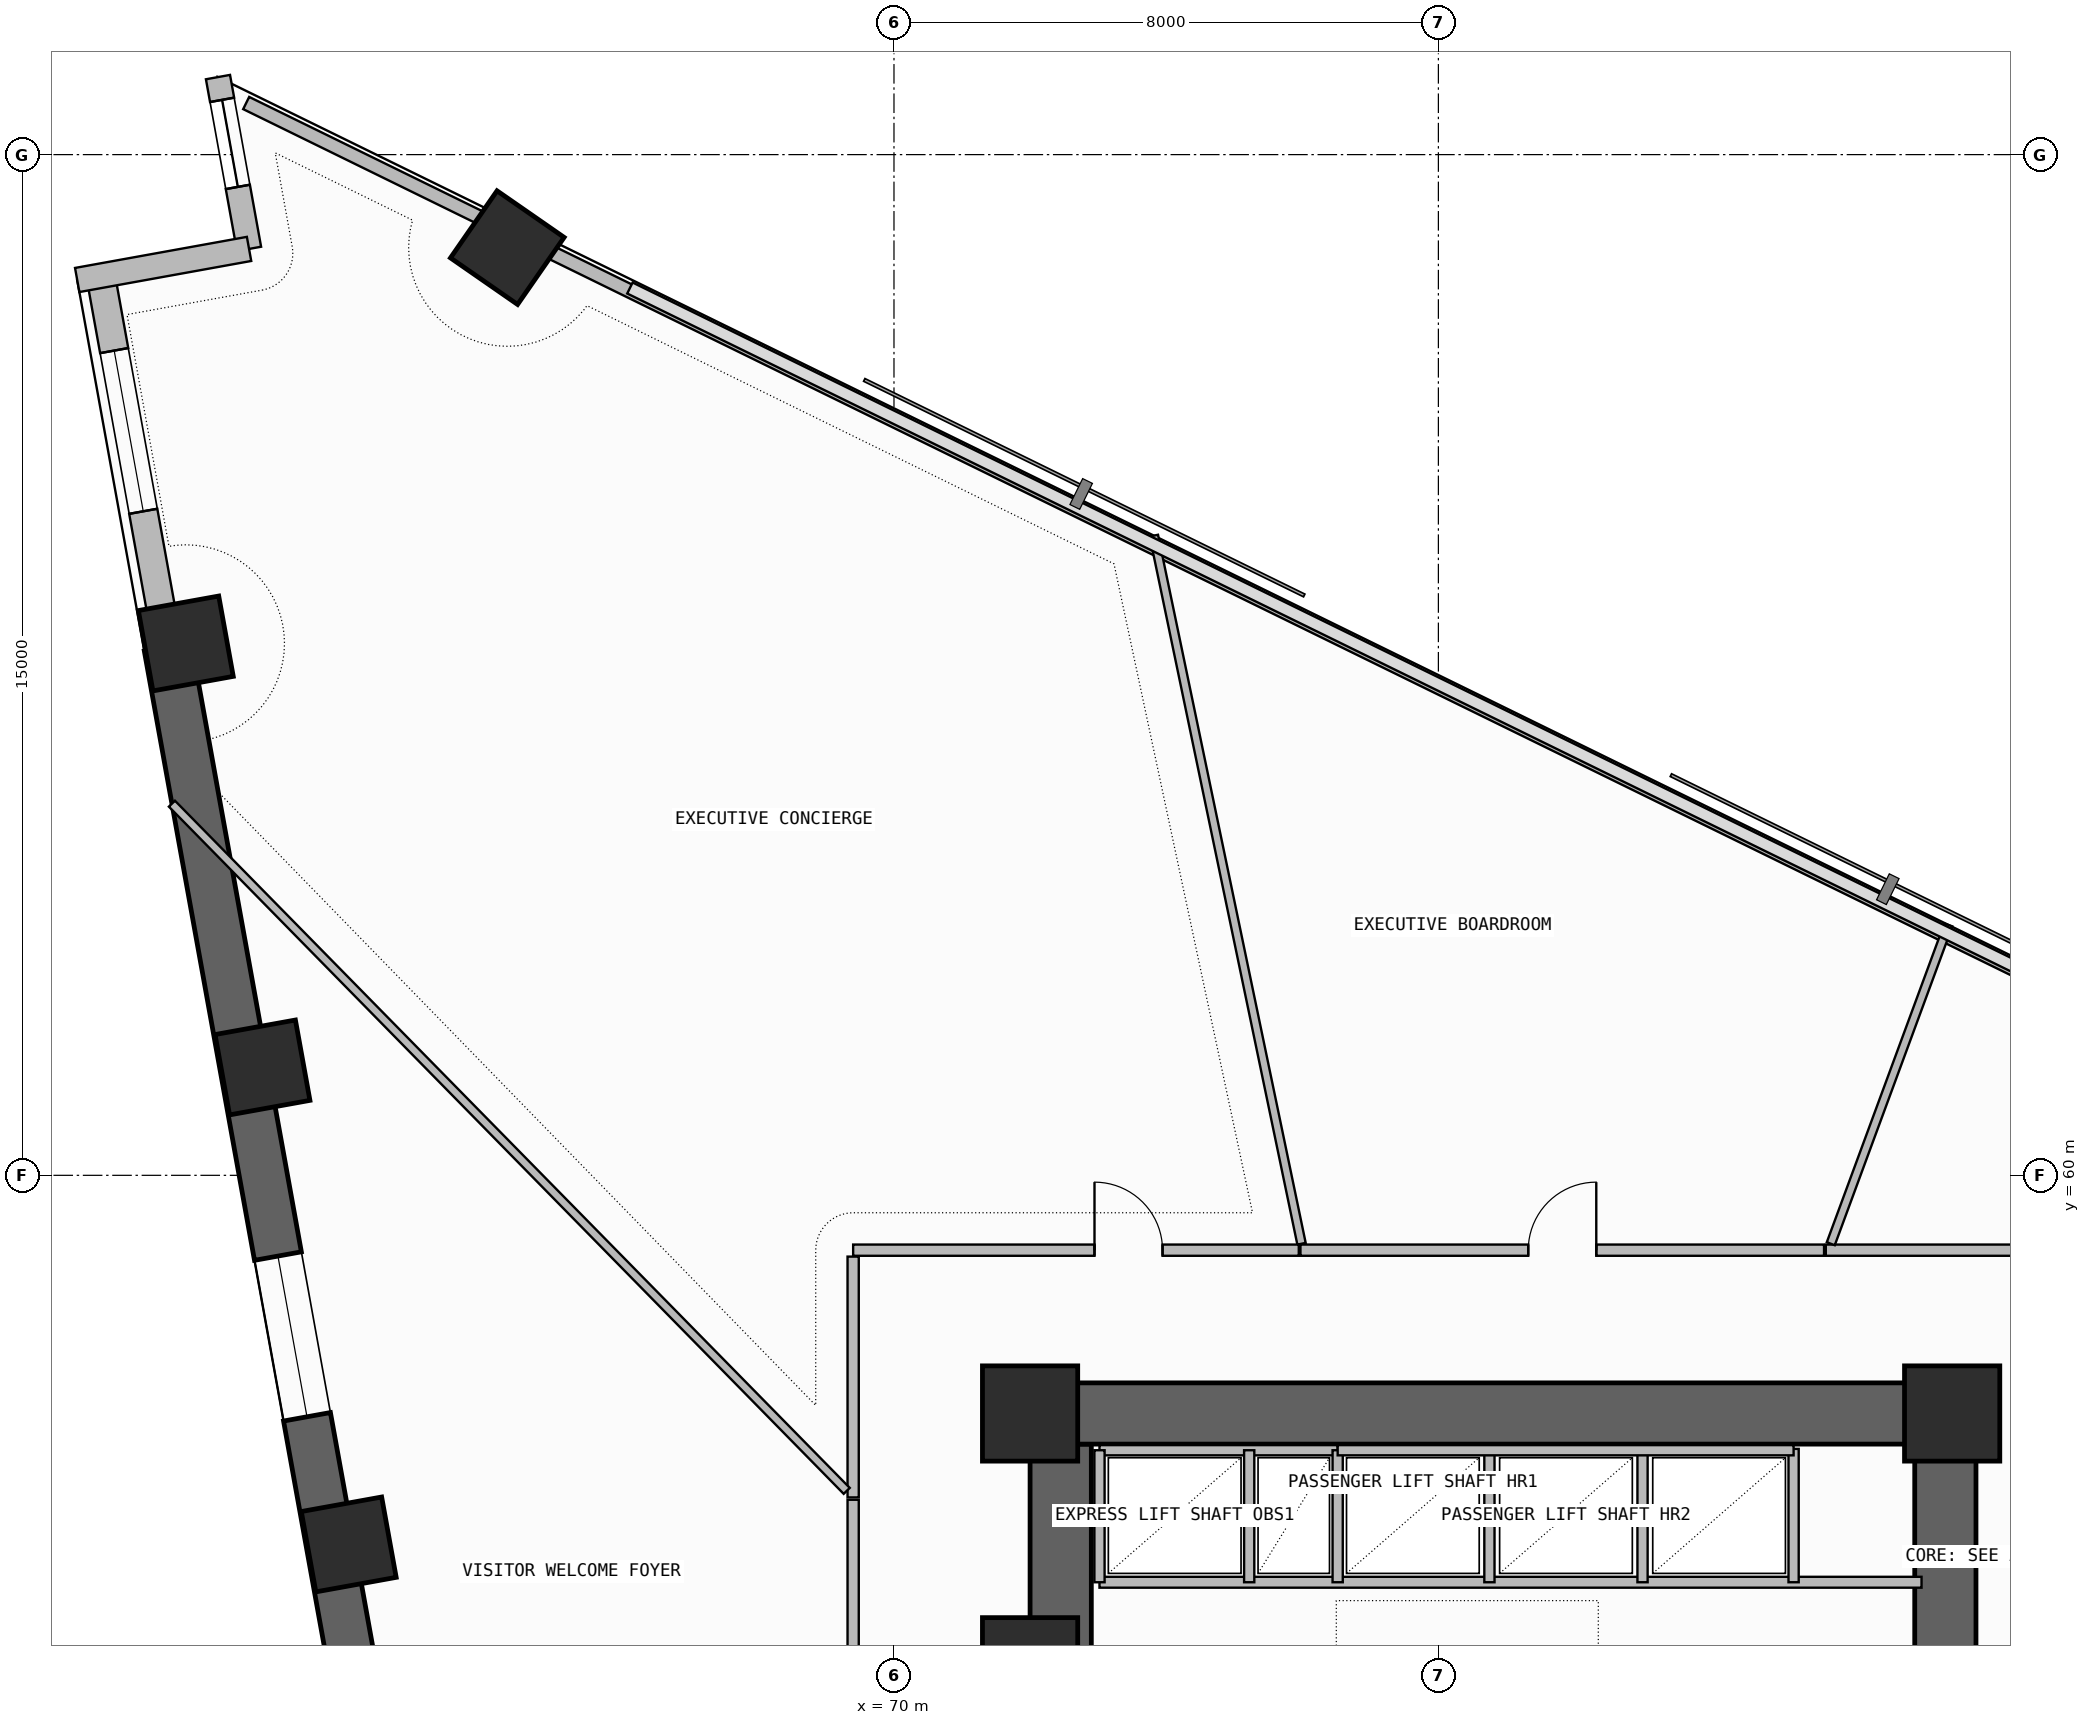
"""IFC4 building model, lengths in metres.
Left out: names, types, materials, properties, quantities, classifications, styles, units other than length and angle.
Written with IfcOpenShell. Run it as: python <this file> out.ifc"""

import sys

from ifc_helpers import new_model, si_unit, direction, frame, frame_2d, origin, origin_2d, place, context, subcontext, project, spatial, rectangle, extrude, element, fill, save


model = new_model("IFC4")
c1 = context("Model", 3, precision=1e-05, world=origin(), true_north=direction((0.0, 1.0)))
c2 = subcontext(c1, "Body", "Model", "MODEL_VIEW")
j1 = project(units=[si_unit("LENGTHUNIT", "METRE"), si_unit("PLANEANGLEUNIT", "RADIAN")], contexts=[c1])
p1 = place(None, origin())
s1 = spatial("IfcSite", under=j1, at=p1, CompositionType="ELEMENT")
p2 = place(p1, origin())
s2 = spatial("IfcBuilding", under=s1, at=p2, CompositionType="ELEMENT")
p3 = place(p2, frame((0.0, 0.0, 99.3)))
s3 = spatial("IfcBuildingStorey", under=s2, at=p3, CompositionType="ELEMENT", Elevation=99.3)
p4 = place(p3, frame((72.45, 43.35, -0.26), z_axis=(0.0, 0.0, 1.0), x_axis=(0.0, 1.0, 0.0)))
e1 = element("IfcWall", 1, at=p4, inside=s3, PredefinedType="SHEAR", context=c2, shape_type="SweptSolid", body=[
    extrude(rectangle(XDim=12.7, YDim=0.9, at=frame_2d((6.35, 0.0))), origin(), (0.0, 0.0, 1.0), 3.6),
])
p5 = place(p4, frame((1.35, 0.0, 0.26)))
e2 = element("IfcOpeningElement", 2, at=p5, cuts=e1, PredefinedType="OPENING", context=c2, shape_type="SweptSolid", body=[
    extrude(rectangle(XDim=1.2, YDim=2.2, at=frame_2d((0.6, 1.1))), frame((0.0, 0.46, 0.0), z_axis=(0.0, -1.0, 0.0), x_axis=(1.0, 0.0, 0.0)), (0.0, 0.0, 1.0), 0.92),
])
p6 = place(p3, frame((72.0, 56.5, -0.26), z_axis=(0.0, 0.0, 1.0), x_axis=(1.0, 0.0, 0.0)))
e3 = element("IfcWall", 3, at=p6, inside=s3, PredefinedType="SHEAR", context=c2, shape_type="SweptSolid", body=[
    extrude(rectangle(XDim=13.9, YDim=0.9, at=frame_2d((6.95, 0.0))), origin(), (0.0, 0.0, 1.0), 3.6),
])
p7 = place(p3, frame((85.45, 47.6, -0.26), z_axis=(0.0, 0.0, 1.0), x_axis=(0.0, 1.0, 0.0)))
e4 = element("IfcWall", 4, at=p7, inside=s3, PredefinedType="SHEAR", context=c2, shape_type="SweptSolid", body=[
    extrude(rectangle(XDim=8.45, YDim=0.9, at=frame_2d((4.225, 0.0))), origin(), (0.0, 0.0, 1.0), 3.6),
])
for number, where, z_axis, x_axis in (
    (5, (72.0, 52.8, 0.0), (0.0, 0.0, 1.0), (1.0, 0.0, 0.0)),
    (6, (72.0, 56.5, 0.0), (0.0, 0.0, 1.0), (1.0, 0.0, 0.0)),
    (7, (85.55, 56.5, 0.0), (0.0, 0.0, 1.0), (1.0, 0.0, 0.0)),
):
    element("IfcColumn", number, at=place(p3, frame(where, z_axis=z_axis, x_axis=x_axis)), inside=s3, PredefinedType="COLUMN", context=c2, shape_type="SweptSolid", body=[
        extrude(rectangle(XDim=1.4, YDim=1.4, at=origin_2d()), origin(), (0.0, 0.0, 1.0), 3.6),
    ])
for number, where, z_axis, x_axis in (
    (8, (64.318, 73.633, 0.0), (0.0, 0.0, 1.0), (0.57, 0.822, 0.0)),
    (9, (59.594, 67.816, 0.0), (0.0, 0.0, 1.0), (-0.178, 0.984, 0.0)),
    (10, (60.72, 61.585, 0.0), (0.0, 0.0, 1.0), (-0.178, 0.984, 0.0)),
    (11, (61.988, 54.575, 0.0), (0.0, 0.0, 1.0), (-0.178, 0.984, 0.0)),
):
    element("IfcColumn", number, at=place(p3, frame(where, z_axis=z_axis, x_axis=x_axis)), inside=s3, PredefinedType="COLUMN", context=c2, shape_type="SweptSolid", body=[
        extrude(rectangle(XDim=1.2, YDim=1.2, at=origin_2d()), origin(), (0.0, 0.0, 1.0), 3.6),
    ])
p8 = place(p3, frame((58.342, 73.22, 0.0), z_axis=(0.0, 0.0, 1.0), x_axis=(0.177981837245, -0.984033772597, 0.0)))
e12 = element("IfcWall", 12, at=p8, inside=s3, PredefinedType="SOLIDWALL", context=c2, shape_type="SweptSolid", body=[
    extrude(rectangle(XDim=5.54, YDim=0.42, at=frame_2d((2.77, 0.0))), origin(), (0.0, 0.0, 1.0), 2.725),
])
p9 = place(p8, frame((1.118, 0.0, 1.2)))
e13 = element("IfcOpeningElement", 13, at=p9, cuts=e12, PredefinedType="OPENING", context=c2, shape_type="SweptSolid", body=[
    extrude(rectangle(XDim=2.4, YDim=0.9, at=frame_2d((1.2, 0.45))), frame((0.0, 0.22, 0.0), z_axis=(0.0, -1.0, 0.0), x_axis=(1.0, 0.0, 0.0)), (0.0, 0.0, 1.0), 0.44),
])
p10 = place(p3, frame((59.328, 67.768, -0.26), z_axis=(0.0, 0.0, 1.0), x_axis=(0.177933213615, -0.984042565895, 0.0)))
e14 = element("IfcWall", 14, at=p10, inside=s3, PredefinedType="SHEAR", context=c2, shape_type="SweptSolid", body=[
    extrude(rectangle(XDim=20.579, YDim=0.7, at=frame_2d((10.289, 0.0))), origin(), (0.0, 0.0, 1.0), 3.6),
])
p11 = place(p10, frame((9.1, 0.0, 1.2)))
e15 = element("IfcOpeningElement", 15, at=p11, cuts=e14, PredefinedType="OPENING", context=c2, shape_type="SweptSolid", body=[
    extrude(rectangle(XDim=2.4, YDim=0.9, at=frame_2d((1.2, 0.45))), frame((0.0, 0.36, 0.0), z_axis=(0.0, -1.0, 0.0), x_axis=(1.0, 0.0, 0.0)), (0.0, 0.0, 1.0), 0.72),
])
p12 = place(p3, frame((60.066, 76.139, 0.0), z_axis=(0.0, 0.0, 1.0), x_axis=(0.177897493713, -0.984049024048, 0.0)))
e16 = element("IfcWall", 16, at=p12, inside=s3, PredefinedType="SOLIDWALL", context=c2, shape_type="SweptSolid", body=[
    extrude(rectangle(XDim=2.566, YDim=0.36, at=frame_2d((1.283, 0.0))), origin(), (0.0, 0.0, 1.0), 3.34),
])
p13 = place(p12, frame((0.34, 0.0, 0.45)))
e17 = element("IfcOpeningElement", 17, at=p13, cuts=e16, PredefinedType="OPENING", context=c2, shape_type="SweptSolid", body=[
    extrude(rectangle(XDim=1.3, YDim=2.4, at=frame_2d((0.65, 1.2))), frame((0.0, 0.19, 0.0), z_axis=(0.0, -1.0, 0.0), x_axis=(1.0, 0.0, 0.0)), (0.0, 0.0, 1.0), 0.38),
])
p14 = place(p3, frame((60.523, 73.614, 0.0), z_axis=(0.0, 0.0, 1.0), x_axis=(-0.984046012923, -0.177914149102, 0.0)))
e18 = element("IfcWall", 18, at=p14, inside=s3, PredefinedType="SOLIDWALL", context=c2, shape_type="SweptSolid", body=[
    extrude(rectangle(XDim=2.566, YDim=0.36, at=frame_2d((1.283, 0.0))), origin(), (0.0, 0.0, 1.0), 3.34),
])
p15 = place(p3, frame((88.921, 61.823, 0.0), z_axis=(0.0, 0.0, 1.0), x_axis=(-0.897993533426, 0.440008652103, 0.0)))
e19 = element("IfcWall", 19, at=p15, inside=s3, PredefinedType="PARAPET", context=c2, shape_type="SweptSolid", body=[
    extrude(rectangle(XDim=26.864, YDim=0.2, at=frame_2d((13.432, 0.0))), origin(), (0.0, 0.0, 1.0), 1.15),
])
p16 = place(p3, frame((64.032, 74.018, 0.0), z_axis=(0.0, 0.0, 1.0), x_axis=(-0.89799103332, 0.440013754417, 0.0)))
e20 = element("IfcWall", 20, at=p16, inside=s3, PredefinedType="PARAPET", context=c2, shape_type="SweptSolid", body=[
    extrude(rectangle(XDim=3.955, YDim=0.2, at=frame_2d((1.978, 0.0))), origin(), (0.0, 0.0, 1.0), 1.15),
])
p17 = place(p3, frame((73.02, 54.02, 0.0), z_axis=(0.0, 0.0, 1.0), x_axis=(1.0, 0.0, 0.0)))
e21 = element("IfcWall", 21, at=p17, inside=s3, PredefinedType="SOLIDWALL", context=c2, shape_type="SweptSolid", body=[
    extrude(rectangle(XDim=12.08, YDim=0.16, at=frame_2d((6.04, 0.0))), origin(), (0.0, 0.0, 1.0), 3.34),
])
p18 = place(p3, frame((73.02, 55.96, 0.0), z_axis=(0.0, 0.0, 1.0), x_axis=(1.0, 0.0, 0.0)))
e22 = element("IfcWall", 22, at=p18, inside=s3, PredefinedType="SOLIDWALL", context=c2, shape_type="SweptSolid", body=[
    extrude(rectangle(XDim=3.5, YDim=0.15, at=frame_2d((1.75, 0.0))), origin(), (0.0, 0.0, 1.0), 3.34),
])
p19 = place(p3, frame((73.02, 54.02, 0.0), z_axis=(0.0, 0.0, 1.0), x_axis=(0.0, 1.0, 0.0)))
e23 = element("IfcWall", 23, at=p19, inside=s3, PredefinedType="PLUMBINGWALL", context=c2, shape_type="SweptSolid", body=[
    extrude(rectangle(XDim=1.94, YDim=0.15, at=frame_2d((0.97, 0.0))), origin(), (0.0, 0.0, 1.0), 3.34),
])
p20 = place(p3, frame((76.52, 54.02, 0.0), z_axis=(0.0, 0.0, 1.0), x_axis=(0.0, 1.0, 0.0)))
e24 = element("IfcWall", 24, at=p20, inside=s3, PredefinedType="SOLIDWALL", context=c2, shape_type="SweptSolid", body=[
    extrude(rectangle(XDim=1.94, YDim=0.15, at=frame_2d((0.97, 0.0))), origin(), (0.0, 0.0, 1.0), 3.34),
])
p21 = place(p3, frame((75.22, 54.02, 0.0), z_axis=(0.0, 0.0, 1.0), x_axis=(0.0, 1.0, 0.0)))
e25 = element("IfcWall", 25, at=p21, inside=s3, PredefinedType="PLUMBINGWALL", context=c2, shape_type="SweptSolid", body=[
    extrude(rectangle(XDim=1.94, YDim=0.15, at=frame_2d((0.97, 0.0))), origin(), (0.0, 0.0, 1.0), 3.34),
])
for number, where, z_axis, x_axis in (
    (26, (78.75, 54.02, 0.0), (0.0, 0.0, 1.0), (0.0, 1.0, 0.0)),
    (27, (81.0, 54.02, 0.0), (0.0, 0.0, 1.0), (0.0, 1.0, 0.0)),
):
    element("IfcWall", number, at=place(p3, frame(where, z_axis=z_axis, x_axis=x_axis)), inside=s3, PredefinedType="PLUMBINGWALL", context=c2, shape_type="SweptSolid", body=[
        extrude(rectangle(XDim=1.96, YDim=0.15, at=frame_2d((0.98, 0.0))), origin(), (0.0, 0.0, 1.0), 3.34),
    ])
p22 = place(p3, frame((83.22, 54.02, 0.0), z_axis=(0.0, 0.0, 1.0), x_axis=(0.0, 1.0, 0.0)))
e28 = element("IfcWall", 28, at=p22, inside=s3, PredefinedType="SOLIDWALL", context=c2, shape_type="SweptSolid", body=[
    extrude(rectangle(XDim=1.96, YDim=0.15, at=frame_2d((0.98, 0.0))), origin(), (0.0, 0.0, 1.0), 3.34),
])
p23 = place(p3, frame((76.52, 55.96, 0.0), z_axis=(0.0, 0.0, 1.0), x_axis=(1.0, 0.0, 0.0)))
e29 = element("IfcWall", 29, at=p23, inside=s3, PredefinedType="SOLIDWALL", context=c2, shape_type="SweptSolid", body=[
    extrude(rectangle(XDim=6.7, YDim=0.15, at=frame_2d((3.35, 0.0))), origin(), (0.0, 0.0, 1.0), 3.34),
])
p24 = place(p3, frame((93.442, 58.9, 0.0), z_axis=(0.0, 0.0, 1.0), x_axis=(-1.0, 0.0, 0.0)))
e30 = element("IfcWall", 30, at=p24, inside=s3, PredefinedType="PARTITIONING", context=c2, shape_type="SweptSolid", body=[
    extrude(rectangle(XDim=9.749, YDim=0.165, at=frame_2d((4.875, 0.0))), origin(), (0.0, 0.0, 1.0), 2.725),
])
p25 = place(p3, frame((83.766, 58.994, 0.0), z_axis=(0.0, 0.0, 1.0), x_axis=(0.345974939757, 0.938243753542, 0.0)))
e31 = element("IfcWall", 31, at=p25, inside=s3, PredefinedType="PARTITIONING", context=c2, shape_type="SweptSolid", body=[
    extrude(rectangle(XDim=4.994, YDim=0.125, at=frame_2d((2.497, 0.0))), origin(), (0.0, 0.0, 1.0), 3.34),
])
p26 = place(p3, frame((83.667, 58.9, 0.0), z_axis=(0.0, 0.0, 1.0), x_axis=(-1.0, 0.0, 0.0)))
e32 = element("IfcWall", 32, at=p26, inside=s3, PredefinedType="PARTITIONING", context=c2, shape_type="SweptSolid", body=[
    extrude(rectangle(XDim=7.694, YDim=0.165, at=frame_2d((3.847, 0.0))), origin(), (0.0, 0.0, 1.0), 3.34),
])
p27 = place(p26, frame((3.347, 0.0, 0.0)))
e33 = element("IfcOpeningElement", 33, at=p27, cuts=e32, PredefinedType="OPENING", context=c2, shape_type="SweptSolid", body=[
    extrude(rectangle(XDim=1.0, YDim=2.2, at=frame_2d((0.5, 1.1))), frame((0.0, 0.093, 0.0), z_axis=(0.0, -1.0, 0.0), x_axis=(1.0, 0.0, 0.0)), (0.0, 0.0, 1.0), 0.185),
])
p28 = place(p3, frame((75.989, 58.994, 0.0), z_axis=(0.0, 0.0, 1.0), x_axis=(-0.204152353371, 0.978939128145, 0.0)))
e34 = element("IfcWall", 34, at=p28, inside=s3, PredefinedType="PARTITIONING", context=c2, shape_type="SweptSolid", body=[
    extrude(rectangle(XDim=10.63, YDim=0.125, at=frame_2d((5.315, 0.0))), origin(), (0.0, 0.0, 1.0), 3.34),
])
p29 = place(p3, frame((75.948, 58.9, 0.0), z_axis=(0.0, 0.0, 1.0), x_axis=(-1.0, 0.0, 0.0)))
e35 = element("IfcWall", 35, at=p29, inside=s3, PredefinedType="PARTITIONING", context=c2, shape_type="SweptSolid", body=[
    extrude(rectangle(XDim=6.549, YDim=0.165, at=frame_2d((3.274, 0.0))), origin(), (0.0, 0.0, 1.0), 2.725),
])
p30 = place(p29, frame((2.002, 0.0, 0.0)))
e36 = element("IfcOpeningElement", 36, at=p30, cuts=e35, PredefinedType="OPENING", context=c2, shape_type="SweptSolid", body=[
    extrude(rectangle(XDim=1.0, YDim=2.2, at=frame_2d((0.5, 1.1))), frame((0.0, 0.093, 0.0), z_axis=(0.0, -1.0, 0.0), x_axis=(1.0, 0.0, 0.0)), (0.0, 0.0, 1.0), 0.185),
])
p31 = place(p3, frame((69.4, 58.805, 0.0), z_axis=(0.0, 0.0, 1.0), x_axis=(0.0, -1.0, 0.0)))
e37 = element("IfcWall", 37, at=p31, inside=s3, PredefinedType="PARTITIONING", context=c2, shape_type="SweptSolid", body=[
    extrude(rectangle(XDim=3.539, YDim=0.165, at=frame_2d((1.77, 0.0))), origin(), (0.0, 0.0, 1.0), 2.725),
])
p32 = place(p3, frame((69.305, 55.363, 0.0), z_axis=(0.0, 0.0, 1.0), x_axis=(-0.700626009677, 0.71352869218, 0.0)))
e38 = element("IfcWall", 38, at=p32, inside=s3, PredefinedType="PARTITIONING", context=c2, shape_type="SweptSolid", body=[
    extrude(rectangle(XDim=14.153, YDim=0.125, at=frame_2d((7.077, 0.0))), origin(), (0.0, 0.0, 1.0), 2.725),
])
p33 = place(p3, frame((69.4, 55.232, 0.0), z_axis=(0.0, 0.0, 1.0), x_axis=(0.0, -1.0, 0.0)))
e39 = element("IfcWall", 39, at=p33, inside=s3, PredefinedType="PARTITIONING", context=c2, shape_type="SweptSolid", body=[
    extrude(rectangle(XDim=7.292, YDim=0.165, at=frame_2d((3.646, 0.0))), origin(), (0.0, 0.0, 1.0), 2.725),
])
p34 = place(p33, frame((4.03, 0.0, 0.0)))
e40 = element("IfcOpeningElement", 40, at=p34, cuts=e39, PredefinedType="OPENING", context=c2, shape_type="SweptSolid", body=[
    extrude(rectangle(XDim=1.0, YDim=2.2, at=frame_2d((0.5, 1.1))), frame((0.0, 0.093, 0.0), z_axis=(0.0, -1.0, 0.0), x_axis=(1.0, 0.0, 0.0)), (0.0, 0.0, 1.0), 0.185),
])
p35 = place(p9, origin())
e41 = element("IfcWindow", 41, at=p35, inside=s3, PartitioningType="SINGLE_PANEL", PredefinedType="WINDOW", context=c2, shape_type="SweptSolid", body=[
    extrude(rectangle(XDim=2.4, YDim=0.9, at=frame_2d((1.2, 0.45))), frame((0.0, 0.03, 0.0), z_axis=(0.0, -1.0, 0.0), x_axis=(1.0, 0.0, 0.0)), (0.0, 0.0, 1.0), 0.06),
])
fill(e13, e41)
p36 = place(p11, origin())
e42 = element("IfcWindow", 42, at=p36, inside=s3, PartitioningType="SINGLE_PANEL", PredefinedType="WINDOW", context=c2, shape_type="SweptSolid", body=[
    extrude(rectangle(XDim=2.4, YDim=0.9, at=frame_2d((1.2, 0.45))), frame((0.0, 0.03, 0.0), z_axis=(0.0, -1.0, 0.0), x_axis=(1.0, 0.0, 0.0)), (0.0, 0.0, 1.0), 0.06),
])
fill(e15, e42)
p37 = place(p13, origin())
e43 = element("IfcWindow", 43, at=p37, inside=s3, PartitioningType="SINGLE_PANEL", PredefinedType="WINDOW", context=c2, shape_type="SweptSolid", body=[
    extrude(rectangle(XDim=1.3, YDim=2.4, at=frame_2d((0.65, 1.2))), frame((0.0, 0.03, 0.0), z_axis=(0.0, -1.0, 0.0), x_axis=(1.0, 0.0, 0.0)), (0.0, 0.0, 1.0), 0.06),
])
fill(e17, e43)
p38 = place(p27, frame((1.0, 0.0, 0.0), z_axis=(0.0, 0.0, 1.0), x_axis=(-1.0, 0.0, 0.0)))
e44 = element("IfcDoor", 44, at=p38, inside=s3, OperationType="SINGLE_SWING_RIGHT", PredefinedType="DOOR", context=c2, shape_type="SweptSolid", body=[
    extrude(rectangle(XDim=1.0, YDim=2.2, at=frame_2d((0.5, 1.1))), frame((0.0, 0.025, 0.0), z_axis=(0.0, -1.0, 0.0), x_axis=(1.0, 0.0, 0.0)), (0.0, 0.0, 1.0), 0.05),
])
fill(e33, e44)
p39 = place(p30, frame((1.0, 0.0, 0.0), z_axis=(0.0, 0.0, 1.0), x_axis=(-1.0, 0.0, 0.0)))
e45 = element("IfcDoor", 45, at=p39, inside=s3, OperationType="SINGLE_SWING_LEFT", PredefinedType="DOOR", context=c2, shape_type="SweptSolid", body=[
    extrude(rectangle(XDim=1.0, YDim=2.2, at=frame_2d((0.5, 1.1))), frame((0.0, 0.025, 0.0), z_axis=(0.0, -1.0, 0.0), x_axis=(1.0, 0.0, 0.0)), (0.0, 0.0, 1.0), 0.05),
])
fill(e36, e45)
save(model, sys.argv[1])
